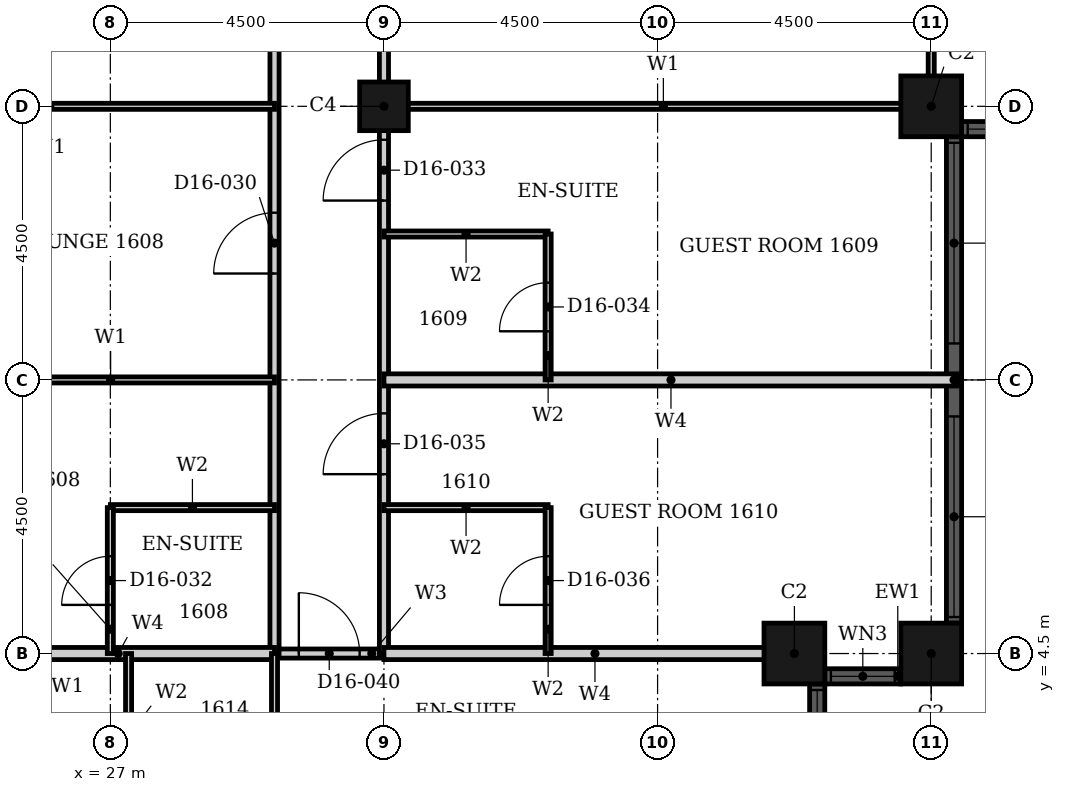
"""IFC4 building model, lengths in metres.
Left out: names, types, materials, properties, quantities, classifications, styles, units other than length and angle.
Written with IfcOpenShell. Run it as: python <this file> out.ifc"""

import sys

from ifc_helpers import new_model, si_unit, direction, frame, frame_2d, origin, origin_2d, place, context, subcontext, project, spatial, rectangle, hollow_rectangle, extrude, element, fill, save


model = new_model("IFC4")
c1 = context("Model", 3, precision=1e-05, world=origin(), true_north=direction((0.0, 1.0)))
c2 = subcontext(c1, "Body", "Model", "MODEL_VIEW")
j1 = project(units=[si_unit("LENGTHUNIT", "METRE"), si_unit("PLANEANGLEUNIT", "RADIAN")], contexts=[c1])
p1 = place(None, origin())
s1 = spatial("IfcSite", under=j1, at=p1, CompositionType="ELEMENT")
p2 = place(p1, origin())
s2 = spatial("IfcBuilding", under=s1, at=p2, CompositionType="ELEMENT")
p3 = place(p2, frame((0.0, 0.0, 70.8)))
s3 = spatial("IfcBuildingStorey", under=s2, at=p3, CompositionType="ELEMENT", Elevation=70.8)
for number, where, z_axis, x_axis in (
    (1, (38.25, 4.5, 0.0), (0.0, 0.0, 1.0), (1.0, 0.0, 0.0)),
    (2, (40.5, 4.5, 0.0), (0.0, 0.0, 1.0), (1.0, 0.0, 0.0)),
    (3, (40.5, 13.5, 0.0), (0.0, 0.0, 1.0), (1.0, 0.0, 0.0)),
):
    element("IfcColumn", number, at=place(p3, frame(where, z_axis=z_axis, x_axis=x_axis)), inside=s3, PredefinedType="COLUMN", context=c2, shape_type="SweptSolid", body=[
        extrude(hollow_rectangle(XDim=1.0, YDim=1.0, WallThickness=0.032, at=origin_2d()), origin(), (0.0, 0.0, 1.0), 3.6),
    ])
p4 = place(p3, frame((31.5, 13.5, 0.0), z_axis=(0.0, 0.0, 1.0), x_axis=(1.0, 0.0, 0.0)))
e4 = element("IfcColumn", 4, at=p4, inside=s3, PredefinedType="COLUMN", context=c2, shape_type="SweptSolid", body=[
    extrude(hollow_rectangle(XDim=0.8, YDim=0.8, WallThickness=0.025, at=origin_2d()), origin(), (0.0, 0.0, 1.0), 3.6),
])
p5 = place(p3, frame((38.625, 2.75, 0.0), z_axis=(0.0, 0.0, 1.0), x_axis=(0.0, 1.0, 0.0)))
e5 = element("IfcWall", 5, at=p5, inside=s3, PredefinedType="SOLIDWALL", context=c2, shape_type="SweptSolid", body=[
    extrude(rectangle(XDim=1.25, YDim=0.25, at=frame_2d((0.625, 0.0))), origin(), (0.0, 0.0, 1.0), 3.6),
])
p6 = place(p5, frame((0.1, 0.0, 0.9)))
e6 = element("IfcOpeningElement", 6, at=p6, cuts=e5, PredefinedType="OPENING", context=c2, shape_type="SweptSolid", body=[
    extrude(rectangle(XDim=1.05, YDim=2.08, at=frame_2d((0.525, 1.04))), frame((0.0, 0.135, 0.0), z_axis=(0.0, -1.0, 0.0), x_axis=(1.0, 0.0, 0.0)), (0.0, 0.0, 1.0), 0.27),
])
p7 = place(p3, frame((38.75, 4.125, 0.0), z_axis=(0.0, 0.0, 1.0), x_axis=(1.0, 0.0, 0.0)))
e7 = element("IfcWall", 7, at=p7, inside=s3, PredefinedType="SOLIDWALL", context=c2, shape_type="SweptSolid", body=[
    extrude(rectangle(XDim=1.25, YDim=0.25, at=frame_2d((0.625, 0.0))), origin(), (0.0, 0.0, 1.0), 3.6),
])
p8 = place(p7, frame((0.1, 0.0, 0.9)))
e8 = element("IfcOpeningElement", 8, at=p8, cuts=e7, PredefinedType="OPENING", context=c2, shape_type="SweptSolid", body=[
    extrude(rectangle(XDim=1.05, YDim=2.08, at=frame_2d((0.525, 1.04))), frame((0.0, 0.135, 0.0), z_axis=(0.0, -1.0, 0.0), x_axis=(1.0, 0.0, 0.0)), (0.0, 0.0, 1.0), 0.27),
])
p9 = place(p3, frame((40.875, 5.0, 0.0), z_axis=(0.0, 0.0, 1.0), x_axis=(0.0, 1.0, 0.0)))
e9 = element("IfcWall", 9, at=p9, inside=s3, PredefinedType="SOLIDWALL", context=c2, shape_type="SweptSolid", body=[
    extrude(rectangle(XDim=8.0, YDim=0.25, at=frame_2d((4.0, 0.0))), origin(), (0.0, 0.0, 1.0), 3.6),
])
p10 = place(p9, frame((0.1, 0.0, 0.9)))
e10 = element("IfcOpeningElement", 10, at=p10, cuts=e9, PredefinedType="OPENING", context=c2, shape_type="SweptSolid", body=[
    extrude(rectangle(XDim=3.3, YDim=2.08, at=frame_2d((1.65, 1.04))), frame((0.0, 0.135, 0.0), z_axis=(0.0, -1.0, 0.0), x_axis=(1.0, 0.0, 0.0)), (0.0, 0.0, 1.0), 0.27),
])
p11 = place(p9, frame((4.6, 0.0, 0.9)))
e11 = element("IfcOpeningElement", 11, at=p11, cuts=e9, PredefinedType="OPENING", context=c2, shape_type="SweptSolid", body=[
    extrude(rectangle(XDim=3.3, YDim=2.08, at=frame_2d((1.65, 1.04))), frame((0.0, 0.135, 0.0), z_axis=(0.0, -1.0, 0.0), x_axis=(1.0, 0.0, 0.0)), (0.0, 0.0, 1.0), 0.27),
])
p12 = place(p3, frame((41.0, 13.125, 0.0), z_axis=(0.0, 0.0, 1.0), x_axis=(1.0, 0.0, 0.0)))
e12 = element("IfcWall", 12, at=p12, inside=s3, PredefinedType="SOLIDWALL", context=c2, shape_type="SweptSolid", body=[
    extrude(rectangle(XDim=3.5, YDim=0.25, at=frame_2d((1.75, 0.0))), origin(), (0.0, 0.0, 1.0), 3.6),
])
p13 = place(p12, frame((0.1, 0.0, 0.9)))
e13 = element("IfcOpeningElement", 13, at=p13, cuts=e12, PredefinedType="OPENING", context=c2, shape_type="SweptSolid", body=[
    extrude(rectangle(XDim=3.3, YDim=2.08, at=frame_2d((1.65, 1.04))), frame((0.0, 0.135, 0.0), z_axis=(0.0, -1.0, 0.0), x_axis=(1.0, 0.0, 0.0)), (0.0, 0.0, 1.0), 0.27),
])
p14 = place(p3, frame((29.7, 4.5, 0.0), z_axis=(0.0, 0.0, 1.0), x_axis=(1.0, 0.0, 0.0)))
e14 = element("IfcWall", 14, at=p14, inside=s3, PredefinedType="PARTITIONING", context=c2, shape_type="SweptSolid", body=[
    extrude(rectangle(XDim=1.8, YDim=0.15, at=frame_2d((0.9, 0.0))), origin(), (0.0, 0.0, 1.0), 3.3),
])
p15 = place(p14, frame((0.4, 0.0, 0.0)))
e15 = element("IfcOpeningElement", 15, at=p15, cuts=e14, PredefinedType="OPENING", context=c2, shape_type="SweptSolid", body=[
    extrude(rectangle(XDim=1.0, YDim=2.1, at=frame_2d((0.5, 1.05))), frame((0.0, 0.085, 0.0), z_axis=(0.0, -1.0, 0.0), x_axis=(1.0, 0.0, 0.0)), (0.0, 0.0, 1.0), 0.17),
])
p16 = place(p3, frame((29.7, 4.5, 0.0), z_axis=(0.0, 0.0, 1.0), x_axis=(0.0, 1.0, 0.0)))
e16 = element("IfcWall", 16, at=p16, inside=s3, PredefinedType="PARTITIONING", context=c2, shape_type="SweptSolid", body=[
    extrude(rectangle(XDim=16.2, YDim=0.15, at=frame_2d((8.1, 0.0))), origin(), (0.0, 0.0, 1.0), 3.3),
])
p17 = place(p16, frame((6.25, 0.0, 0.0)))
e17 = element("IfcOpeningElement", 17, at=p17, cuts=e16, PredefinedType="OPENING", context=c2, shape_type="SweptSolid", body=[
    extrude(rectangle(XDim=1.0, YDim=2.1, at=frame_2d((0.5, 1.05))), frame((0.0, 0.085, 0.0), z_axis=(0.0, -1.0, 0.0), x_axis=(1.0, 0.0, 0.0)), (0.0, 0.0, 1.0), 0.17),
])
p18 = place(p3, frame((31.5, 4.5, 0.0), z_axis=(0.0, 0.0, 1.0), x_axis=(0.0, 1.0, 0.0)))
e18 = element("IfcWall", 18, at=p18, inside=s3, PredefinedType="PARTITIONING", context=c2, shape_type="SweptSolid", body=[
    extrude(rectangle(XDim=16.2, YDim=0.15, at=frame_2d((8.1, 0.0))), origin(), (0.0, 0.0, 1.0), 2.58),
])
p19 = place(p18, frame((7.45, 0.0, 0.0)))
e19 = element("IfcOpeningElement", 19, at=p19, cuts=e18, PredefinedType="OPENING", context=c2, shape_type="SweptSolid", body=[
    extrude(rectangle(XDim=1.0, YDim=2.1, at=frame_2d((0.5, 1.05))), frame((0.0, 0.085, 0.0), z_axis=(0.0, -1.0, 0.0), x_axis=(1.0, 0.0, 0.0)), (0.0, 0.0, 1.0), 0.17),
])
p20 = place(p18, frame((2.95, 0.0, 0.0)))
e20 = element("IfcOpeningElement", 20, at=p20, cuts=e18, PredefinedType="OPENING", context=c2, shape_type="SweptSolid", body=[
    extrude(rectangle(XDim=1.0, YDim=2.1, at=frame_2d((0.5, 1.05))), frame((0.0, 0.085, 0.0), z_axis=(0.0, -1.0, 0.0), x_axis=(1.0, 0.0, 0.0)), (0.0, 0.0, 1.0), 0.17),
])
p21 = place(p3, frame((31.5, 13.5, 0.0), z_axis=(0.0, 0.0, 1.0), x_axis=(1.0, 0.0, 0.0)))
e21 = element("IfcWall", 21, at=p21, inside=s3, PredefinedType="PARTITIONING", context=c2, shape_type="SweptSolid", body=[
    extrude(rectangle(XDim=9.19, YDim=0.1, at=frame_2d((4.595, 0.0))), origin(), (0.0, 0.0, 1.0), 2.38),
])
p22 = place(p3, frame((22.31, 13.5, 0.0), z_axis=(0.0, 0.0, 1.0), x_axis=(1.0, 0.0, 0.0)))
e22 = element("IfcWall", 22, at=p22, inside=s3, PredefinedType="PARTITIONING", context=c2, shape_type="SweptSolid", body=[
    extrude(rectangle(XDim=7.39, YDim=0.1, at=frame_2d((3.695, 0.0))), origin(), (0.0, 0.0, 1.0), 2.38),
])
p23 = place(p3, frame((22.06, 9.0, 0.0), z_axis=(0.0, 0.0, 1.0), x_axis=(1.0, 0.0, 0.0)))
e23 = element("IfcWall", 23, at=p23, inside=s3, PredefinedType="PARTITIONING", context=c2, shape_type="SweptSolid", body=[
    extrude(rectangle(XDim=7.64, YDim=0.1, at=frame_2d((3.82, 0.0))), origin(), (0.0, 0.0, 1.0), 3.3),
])
p24 = place(p23, frame((1.35, 0.0, 0.0)))
e24 = element("IfcOpeningElement", 24, at=p24, cuts=e23, PredefinedType="OPENING", context=c2, shape_type="SweptSolid", body=[
    extrude(rectangle(XDim=0.9, YDim=2.1, at=frame_2d((0.45, 1.05))), frame((0.0, 0.06, 0.0), z_axis=(0.0, -1.0, 0.0), x_axis=(1.0, 0.0, 0.0)), (0.0, 0.0, 1.0), 0.12),
])
p25 = place(p3, frame((40.5, 13.31, 0.0), z_axis=(0.0, 0.0, 1.0), x_axis=(0.0, 1.0, 0.0)))
e25 = element("IfcWall", 25, at=p25, inside=s3, PredefinedType="PARTITIONING", context=c2, shape_type="SweptSolid", body=[
    extrude(rectangle(XDim=7.39, YDim=0.1, at=frame_2d((3.695, 0.0))), origin(), (0.0, 0.0, 1.0), 3.3),
])
p26 = place(p3, frame((31.5, 4.5, 0.0), z_axis=(0.0, 0.0, 1.0), x_axis=(1.0, 0.0, 0.0)))
e26 = element("IfcWall", 26, at=p26, inside=s3, PredefinedType="PARTITIONING", context=c2, shape_type="SweptSolid", body=[
    extrude(rectangle(XDim=6.94, YDim=0.2, at=frame_2d((3.47, 0.0))), origin(), (0.0, 0.0, 1.0), 3.3),
])
p27 = place(p3, frame((24.56, 4.5, 0.0), z_axis=(0.0, 0.0, 1.0), x_axis=(1.0, 0.0, 0.0)))
e27 = element("IfcWall", 27, at=p27, inside=s3, PredefinedType="PARTITIONING", context=c2, shape_type="SweptSolid", body=[
    extrude(rectangle(XDim=5.14, YDim=0.2, at=frame_2d((2.57, 0.0))), origin(), (0.0, 0.0, 1.0), 3.3),
])
p28 = place(p3, frame((31.5, 9.0, 0.0), z_axis=(0.0, 0.0, 1.0), x_axis=(1.0, 0.0, 0.0)))
e28 = element("IfcWall", 28, at=p28, inside=s3, PredefinedType="PARTITIONING", context=c2, shape_type="SweptSolid", body=[
    extrude(rectangle(XDim=9.44, YDim=0.2, at=frame_2d((4.72, 0.0))), origin(), (0.0, 0.0, 1.0), 3.3),
])
for number, where, z_axis, x_axis in (
    (29, (31.5, 11.4, 0.0), (0.0, 0.0, 1.0), (1.0, 0.0, 0.0)),
    (30, (31.5, 6.9, 0.0), (0.0, 0.0, 1.0), (1.0, 0.0, 0.0)),
    (31, (27.0, 6.9, 0.0), (0.0, 0.0, 1.0), (1.0, 0.0, 0.0)),
):
    element("IfcWall", number, at=place(p3, frame(where, z_axis=z_axis, x_axis=x_axis)), inside=s3, PredefinedType="PARTITIONING", context=c2, shape_type="SweptSolid", body=[
        extrude(rectangle(XDim=2.7, YDim=0.1, at=frame_2d((1.35, 0.0))), origin(), (0.0, 0.0, 1.0), 3.3),
    ])
p29 = place(p3, frame((27.0, 4.5, 0.0), z_axis=(0.0, 0.0, 1.0), x_axis=(0.0, 1.0, 0.0)))
e32 = element("IfcWall", 32, at=p29, inside=s3, PredefinedType="PARTITIONING", context=c2, shape_type="SweptSolid", body=[
    extrude(rectangle(XDim=2.4, YDim=0.1, at=frame_2d((1.2, 0.0))), origin(), (0.0, 0.0, 1.0), 2.58),
])
p30 = place(p29, frame((0.8, 0.0, 0.0)))
e33 = element("IfcOpeningElement", 33, at=p30, cuts=e32, PredefinedType="OPENING", context=c2, shape_type="SweptSolid", body=[
    extrude(rectangle(XDim=0.8, YDim=2.1, at=frame_2d((0.4, 1.05))), frame((0.0, 0.06, 0.0), z_axis=(0.0, -1.0, 0.0), x_axis=(1.0, 0.0, 0.0)), (0.0, 0.0, 1.0), 0.12),
])
for number, where, z_axis, x_axis in (
    (34, (27.3, 1.8, 0.0), (0.0, 0.0, 1.0), (0.0, 1.0, 0.0)),
    (35, (29.7, 1.8, 0.0), (0.0, 0.0, 1.0), (0.0, 1.0, 0.0)),
):
    element("IfcWall", number, at=place(p3, frame(where, z_axis=z_axis, x_axis=x_axis)), inside=s3, PredefinedType="PARTITIONING", context=c2, shape_type="SweptSolid", body=[
        extrude(rectangle(XDim=2.7, YDim=0.1, at=frame_2d((1.35, 0.0))), origin(), (0.0, 0.0, 1.0), 3.3),
    ])
p31 = place(p3, frame((34.2, 9.0, 0.0), z_axis=(0.0, 0.0, 1.0), x_axis=(0.0, 1.0, 0.0)))
e36 = element("IfcWall", 36, at=p31, inside=s3, PredefinedType="PARTITIONING", context=c2, shape_type="SweptSolid", body=[
    extrude(rectangle(XDim=2.4, YDim=0.1, at=frame_2d((1.2, 0.0))), origin(), (0.0, 0.0, 1.0), 3.3),
])
p32 = place(p31, frame((0.8, 0.0, 0.0)))
e37 = element("IfcOpeningElement", 37, at=p32, cuts=e36, PredefinedType="OPENING", context=c2, shape_type="SweptSolid", body=[
    extrude(rectangle(XDim=0.8, YDim=2.1, at=frame_2d((0.4, 1.05))), frame((0.0, 0.06, 0.0), z_axis=(0.0, -1.0, 0.0), x_axis=(1.0, 0.0, 0.0)), (0.0, 0.0, 1.0), 0.12),
])
p33 = place(p3, frame((34.2, 4.5, 0.0), z_axis=(0.0, 0.0, 1.0), x_axis=(0.0, 1.0, 0.0)))
e38 = element("IfcWall", 38, at=p33, inside=s3, PredefinedType="PARTITIONING", context=c2, shape_type="SweptSolid", body=[
    extrude(rectangle(XDim=2.4, YDim=0.1, at=frame_2d((1.2, 0.0))), origin(), (0.0, 0.0, 1.0), 3.3),
])
p34 = place(p33, frame((0.8, 0.0, 0.0)))
e39 = element("IfcOpeningElement", 39, at=p34, cuts=e38, PredefinedType="OPENING", context=c2, shape_type="SweptSolid", body=[
    extrude(rectangle(XDim=0.8, YDim=2.1, at=frame_2d((0.4, 1.05))), frame((0.0, 0.06, 0.0), z_axis=(0.0, -1.0, 0.0), x_axis=(1.0, 0.0, 0.0)), (0.0, 0.0, 1.0), 0.12),
])
p35 = place(p6, origin())
e40 = element("IfcWindow", 40, at=p35, inside=s3, PartitioningType="SINGLE_PANEL", PredefinedType="WINDOW", context=c2, shape_type="SweptSolid", body=[
    extrude(rectangle(XDim=1.05, YDim=2.08, at=frame_2d((0.525, 1.04))), frame((0.0, 0.03, 0.0), z_axis=(0.0, -1.0, 0.0), x_axis=(1.0, 0.0, 0.0)), (0.0, 0.0, 1.0), 0.06),
])
fill(e6, e40)
p36 = place(p8, origin())
e41 = element("IfcWindow", 41, at=p36, inside=s3, PartitioningType="SINGLE_PANEL", PredefinedType="WINDOW", context=c2, shape_type="SweptSolid", body=[
    extrude(rectangle(XDim=1.05, YDim=2.08, at=frame_2d((0.525, 1.04))), frame((0.0, 0.03, 0.0), z_axis=(0.0, -1.0, 0.0), x_axis=(1.0, 0.0, 0.0)), (0.0, 0.0, 1.0), 0.06),
])
fill(e8, e41)
p37 = place(p10, origin())
e42 = element("IfcWindow", 42, at=p37, inside=s3, PartitioningType="SINGLE_PANEL", PredefinedType="WINDOW", context=c2, shape_type="SweptSolid", body=[
    extrude(rectangle(XDim=3.3, YDim=2.08, at=frame_2d((1.65, 1.04))), frame((0.0, 0.03, 0.0), z_axis=(0.0, -1.0, 0.0), x_axis=(1.0, 0.0, 0.0)), (0.0, 0.0, 1.0), 0.06),
])
fill(e10, e42)
p38 = place(p11, origin())
e43 = element("IfcWindow", 43, at=p38, inside=s3, PartitioningType="SINGLE_PANEL", PredefinedType="WINDOW", context=c2, shape_type="SweptSolid", body=[
    extrude(rectangle(XDim=3.3, YDim=2.08, at=frame_2d((1.65, 1.04))), frame((0.0, 0.03, 0.0), z_axis=(0.0, -1.0, 0.0), x_axis=(1.0, 0.0, 0.0)), (0.0, 0.0, 1.0), 0.06),
])
fill(e11, e43)
p39 = place(p13, origin())
e44 = element("IfcWindow", 44, at=p39, inside=s3, PartitioningType="SINGLE_PANEL", PredefinedType="WINDOW", context=c2, shape_type="SweptSolid", body=[
    extrude(rectangle(XDim=3.3, YDim=2.08, at=frame_2d((1.65, 1.04))), frame((0.0, 0.03, 0.0), z_axis=(0.0, -1.0, 0.0), x_axis=(1.0, 0.0, 0.0)), (0.0, 0.0, 1.0), 0.06),
])
fill(e13, e44)
p40 = place(p17, origin())
e45 = element("IfcDoor", 45, at=p40, inside=s3, OperationType="SINGLE_SWING_RIGHT", PredefinedType="DOOR", context=c2, shape_type="SweptSolid", body=[
    extrude(rectangle(XDim=1.0, YDim=2.1, at=frame_2d((0.5, 1.05))), frame((0.0, 0.025, 0.0), z_axis=(0.0, -1.0, 0.0), x_axis=(1.0, 0.0, 0.0)), (0.0, 0.0, 1.0), 0.05),
])
fill(e17, e45)
p41 = place(p30, origin())
e46 = element("IfcDoor", 46, at=p41, inside=s3, OperationType="SINGLE_SWING_LEFT", PredefinedType="DOOR", context=c2, shape_type="SweptSolid", body=[
    extrude(rectangle(XDim=0.8, YDim=2.1, at=frame_2d((0.4, 1.05))), frame((0.0, 0.025, 0.0), z_axis=(0.0, -1.0, 0.0), x_axis=(1.0, 0.0, 0.0)), (0.0, 0.0, 1.0), 0.05),
])
fill(e33, e46)
p42 = place(p19, origin())
e47 = element("IfcDoor", 47, at=p42, inside=s3, OperationType="SINGLE_SWING_RIGHT", PredefinedType="DOOR", context=c2, shape_type="SweptSolid", body=[
    extrude(rectangle(XDim=1.0, YDim=2.1, at=frame_2d((0.5, 1.05))), frame((0.0, 0.025, 0.0), z_axis=(0.0, -1.0, 0.0), x_axis=(1.0, 0.0, 0.0)), (0.0, 0.0, 1.0), 0.05),
])
fill(e19, e47)
p43 = place(p32, origin())
e48 = element("IfcDoor", 48, at=p43, inside=s3, OperationType="SINGLE_SWING_LEFT", PredefinedType="DOOR", context=c2, shape_type="SweptSolid", body=[
    extrude(rectangle(XDim=0.8, YDim=2.1, at=frame_2d((0.4, 1.05))), frame((0.0, 0.025, 0.0), z_axis=(0.0, -1.0, 0.0), x_axis=(1.0, 0.0, 0.0)), (0.0, 0.0, 1.0), 0.05),
])
fill(e37, e48)
p44 = place(p20, origin())
e49 = element("IfcDoor", 49, at=p44, inside=s3, OperationType="SINGLE_SWING_RIGHT", PredefinedType="DOOR", context=c2, shape_type="SweptSolid", body=[
    extrude(rectangle(XDim=1.0, YDim=2.1, at=frame_2d((0.5, 1.05))), frame((0.0, 0.025, 0.0), z_axis=(0.0, -1.0, 0.0), x_axis=(1.0, 0.0, 0.0)), (0.0, 0.0, 1.0), 0.05),
])
fill(e20, e49)
p45 = place(p34, origin())
e50 = element("IfcDoor", 50, at=p45, inside=s3, OperationType="SINGLE_SWING_LEFT", PredefinedType="DOOR", context=c2, shape_type="SweptSolid", body=[
    extrude(rectangle(XDim=0.8, YDim=2.1, at=frame_2d((0.4, 1.05))), frame((0.0, 0.025, 0.0), z_axis=(0.0, -1.0, 0.0), x_axis=(1.0, 0.0, 0.0)), (0.0, 0.0, 1.0), 0.05),
])
fill(e39, e50)
p46 = place(p15, origin())
e51 = element("IfcDoor", 51, at=p46, inside=s3, OperationType="SINGLE_SWING_LEFT", PredefinedType="DOOR", context=c2, shape_type="SweptSolid", body=[
    extrude(rectangle(XDim=1.0, YDim=2.1, at=frame_2d((0.5, 1.05))), frame((0.0, 0.025, 0.0), z_axis=(0.0, -1.0, 0.0), x_axis=(1.0, 0.0, 0.0)), (0.0, 0.0, 1.0), 0.05),
])
fill(e15, e51)
save(model, sys.argv[1])
